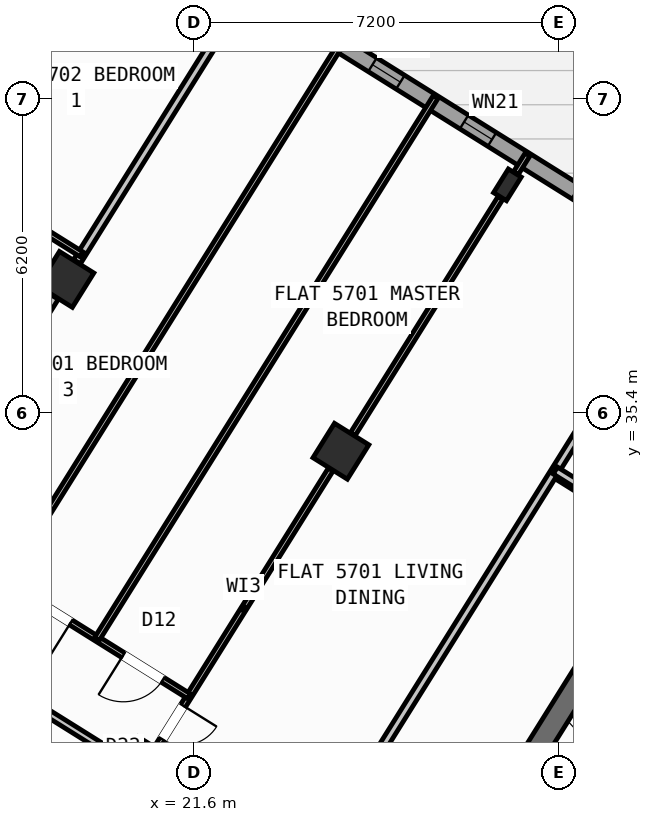
"""IFC4 building model, lengths in metres.
Left out: names, types, materials, properties, quantities, classifications, styles, units other than length and angle.
Written with IfcOpenShell. Run it as: python <this file> out.ifc"""

import sys

from ifc_helpers import new_model, si_unit, direction, frame, frame_2d, origin, origin_2d, place, context, subcontext, project, spatial, rectangle, hollow_rectangle, i_section, extrude, source, transform, mapped, element, fill, save


model = new_model("IFC4")
c1 = context("Model", 3, precision=1e-05, world=origin(), true_north=direction((0.0, 1.0)))
c2 = subcontext(c1, "Body", "Model", "MODEL_VIEW")
j1 = project(units=[si_unit("LENGTHUNIT", "METRE"), si_unit("PLANEANGLEUNIT", "RADIAN")], contexts=[c1])
p1 = place(None, origin())
s1 = spatial("IfcSite", under=j1, at=p1, CompositionType="ELEMENT")
p2 = place(p1, origin())
s2 = spatial("IfcBuilding", under=s1, at=p2, CompositionType="ELEMENT")
p3 = place(p2, frame((0.0, 0.0, 225.6)))
s3 = spatial("IfcBuildingStorey", under=s2, at=p3, CompositionType="ELEMENT", Elevation=225.6)
p4 = place(p3, frame((29.544, 30.636, 0.0), z_axis=(0.0, 0.0, 1.0), x_axis=(-0.529902075036, -0.848058836916, 0.0)))
e1 = element("IfcWall", 1, at=p4, inside=s3, PredefinedType="SHEAR", context=c2, shape_type="SweptSolid", body=[
    extrude(rectangle(XDim=3.625, YDim=0.45, at=frame_2d((1.812, 0.0))), origin(), (0.0, 0.0, 1.0), 3.35),
])
m1 = source(origin(), c2, "Body", "SweptSolid", [
    extrude(i_section(OverallWidth=0.3, OverallDepth=0.55, WebThickness=0.015, FlangeThickness=0.029, at=origin_2d()), origin(), (0.0, 0.0, 1.0), 3.6),
])
p5 = place(p3, frame((27.786, 39.901, 0.0), z_axis=(0.0, 0.0, 1.0), x_axis=(-0.848048096156, 0.529919264233, 0.0)))
e2 = element("IfcColumn", 2, at=p5, inside=s3, PredefinedType="COLUMN", context=c2, shape_type="MappedRepresentation", body=[
    mapped(m1, transform((0.0, 0.0, 0.0), scale=1.0)),
])
m2 = source(origin(), c2, "Body", "SweptSolid", [
    extrude(hollow_rectangle(XDim=0.8, YDim=0.8, WallThickness=0.032, at=origin_2d()), origin(), (0.0, 0.0, 1.0), 3.6),
])
for number, where, z_axis, x_axis in (
    (3, (24.5, 34.643, 0.0), (0.0, 0.0, 1.0), (-0.848, 0.53, 0.0)),
    (4, (20.632, 28.452, 0.0), (0.0, 0.0, 1.0), (-0.848, 0.53, 0.0)),
    (5, (19.073, 38.034, 0.0), (0.0, 0.0, 1.0), (-0.848, 0.53, 0.0)),
):
    element("IfcColumn", number, at=place(p3, frame(where, z_axis=z_axis, x_axis=x_axis)), inside=s3, PredefinedType="COLUMN", context=c2, shape_type="MappedRepresentation", body=[
        mapped(m2, transform((0.0, 0.0, 0.0), scale=1.0)),
    ])
p6 = place(p3, frame((17.424, 47.083, 0.0), z_axis=(0.0, 0.0, 1.0), x_axis=(0.848049927979, -0.529916332693, 0.0)))
e6 = element("IfcWall", 6, at=p6, inside=s3, PredefinedType="STANDARD", context=c2, shape_type="SweptSolid", body=[
    extrude(rectangle(XDim=29.223, YDim=0.32, at=frame_2d((14.612, 0.0))), origin(), (0.0, 0.0, 1.0), 3.35),
])
p7 = place(p6, frame((3.709, 0.0, 0.0)))
e7 = element("IfcOpeningElement", 7, at=p7, cuts=e6, PredefinedType="OPENING", context=c2, shape_type="SweptSolid", body=[
    extrude(rectangle(XDim=1.05, YDim=2.15, at=frame_2d((0.525, 1.075))), frame((0.0, 0.17, 0.0), z_axis=(0.0, -1.0, 0.0), x_axis=(1.0, 0.0, 0.0)), (0.0, 0.0, 1.0), 0.34),
])
p8 = place(p6, frame((0.809, 0.0, 1.0)))
e8 = element("IfcOpeningElement", 8, at=p8, cuts=e6, PredefinedType="OPENING", context=c2, shape_type="SweptSolid", body=[
    extrude(rectangle(XDim=0.9, YDim=1.25, at=frame_2d((0.45, 0.625))), frame((0.0, 0.17, 0.0), z_axis=(0.0, -1.0, 0.0), x_axis=(1.0, 0.0, 0.0)), (0.0, 0.0, 1.0), 0.34),
])
p9 = place(p6, frame((13.811, 0.0, 0.9)))
e9 = element("IfcOpeningElement", 9, at=p9, cuts=e6, PredefinedType="OPENING", context=c2, shape_type="SweptSolid", body=[
    extrude(rectangle(XDim=1.35, YDim=1.45, at=frame_2d((0.675, 0.725))), frame((0.0, 0.17, 0.0), z_axis=(0.0, -1.0, 0.0), x_axis=(1.0, 0.0, 0.0)), (0.0, 0.0, 1.0), 0.34),
])
p10 = place(p6, frame((17.254, 0.0, 1.0)))
e10 = element("IfcOpeningElement", 10, at=p10, cuts=e6, PredefinedType="OPENING", context=c2, shape_type="SweptSolid", body=[
    extrude(rectangle(XDim=0.9, YDim=1.25, at=frame_2d((0.45, 0.625))), frame((0.0, 0.17, 0.0), z_axis=(0.0, -1.0, 0.0), x_axis=(1.0, 0.0, 0.0)), (0.0, 0.0, 1.0), 0.34),
])
p11 = place(p6, frame((21.364, 0.0, 1.0)))
e11 = element("IfcOpeningElement", 11, at=p11, cuts=e6, PredefinedType="OPENING", context=c2, shape_type="SweptSolid", body=[
    extrude(rectangle(XDim=0.9, YDim=1.25, at=frame_2d((0.45, 0.625))), frame((0.0, 0.17, 0.0), z_axis=(0.0, -1.0, 0.0), x_axis=(1.0, 0.0, 0.0)), (0.0, 0.0, 1.0), 0.34),
])
p12 = place(p6, frame((26.003, 0.0, 1.0)))
e12 = element("IfcOpeningElement", 12, at=p12, cuts=e6, PredefinedType="OPENING", context=c2, shape_type="SweptSolid", body=[
    extrude(rectangle(XDim=0.9, YDim=1.25, at=frame_2d((0.45, 0.625))), frame((0.0, 0.17, 0.0), z_axis=(0.0, -1.0, 0.0), x_axis=(1.0, 0.0, 0.0)), (0.0, 0.0, 1.0), 0.34),
])
p13 = place(p6, frame((11.211, 0.0, 1.0)))
e13 = element("IfcOpeningElement", 13, at=p13, cuts=e6, PredefinedType="OPENING", context=c2, shape_type="SweptSolid", body=[
    extrude(rectangle(XDim=0.65, YDim=1.15, at=frame_2d((0.325, 0.575))), frame((0.0, 0.17, 0.0), z_axis=(0.0, -1.0, 0.0), x_axis=(1.0, 0.0, 0.0)), (0.0, 0.0, 1.0), 0.34),
])
p14 = place(p6, frame((9.079, 0.0, 1.0)))
e14 = element("IfcOpeningElement", 14, at=p14, cuts=e6, PredefinedType="OPENING", context=c2, shape_type="SweptSolid", body=[
    extrude(rectangle(XDim=0.65, YDim=1.15, at=frame_2d((0.325, 0.575))), frame((0.0, 0.17, 0.0), z_axis=(0.0, -1.0, 0.0), x_axis=(1.0, 0.0, 0.0)), (0.0, 0.0, 1.0), 0.34),
])
p15 = place(p6, frame((6.951, 0.0, 1.0)))
e15 = element("IfcOpeningElement", 15, at=p15, cuts=e6, PredefinedType="OPENING", context=c2, shape_type="SweptSolid", body=[
    extrude(rectangle(XDim=0.65, YDim=1.15, at=frame_2d((0.325, 0.575))), frame((0.0, 0.17, 0.0), z_axis=(0.0, -1.0, 0.0), x_axis=(1.0, 0.0, 0.0)), (0.0, 0.0, 1.0), 0.34),
])
p16 = place(p3, frame((30.914, 32.829, 0.0), z_axis=(0.0, 0.0, 1.0), x_axis=(-0.848008813643, 0.529982124211, 0.0)))
e16 = element("IfcWall", 16, at=p16, inside=s3, PredefinedType="PARTITIONING", context=c2, shape_type="SweptSolid", body=[
    extrude(rectangle(XDim=2.61, YDim=0.16, at=frame_2d((1.305, 0.0))), origin(), (0.0, 0.0, 1.0), 3.34),
])
p17 = place(p3, frame((31.239, 38.274, 0.0), z_axis=(0.0, 0.0, 1.0), x_axis=(-0.529921796515, -0.848046513806, 0.0)))
e17 = element("IfcWall", 17, at=p17, inside=s3, PredefinedType="PARTITIONING", context=c2, shape_type="SweptSolid", body=[
    extrude(rectangle(XDim=16.5, YDim=0.16, at=frame_2d((8.25, 0.0))), origin(), (0.0, 0.0, 1.0), 3.34),
])
p18 = place(p3, frame((22.495, 24.281, 0.0), z_axis=(0.0, 0.0, 1.0), x_axis=(-0.848052408131, 0.529912363569, 0.0)))
e18 = element("IfcWall", 18, at=p18, inside=s3, PredefinedType="PARTITIONING", context=c2, shape_type="SweptSolid", body=[
    extrude(rectangle(XDim=16.73, YDim=0.16, at=frame_2d((8.365, 0.0))), origin(), (0.0, 0.0, 1.0), 3.34),
])
p19 = place(p18, frame((1.385, 0.0, 0.0)))
e19 = element("IfcOpeningElement", 19, at=p19, cuts=e18, PredefinedType="OPENING", context=c2, shape_type="SweptSolid", body=[
    extrude(rectangle(XDim=1.0, YDim=2.1, at=frame_2d((0.5, 1.05))), frame((0.0, 0.09, 0.0), z_axis=(0.0, -1.0, 0.0), x_axis=(1.0, 0.0, 0.0)), (0.0, 0.0, 1.0), 0.18),
])
p20 = place(p18, frame((14.76, 0.0, 0.0)))
e20 = element("IfcOpeningElement", 20, at=p20, cuts=e18, PredefinedType="OPENING", context=c2, shape_type="SweptSolid", body=[
    extrude(rectangle(XDim=1.0, YDim=2.1, at=frame_2d((0.5, 1.05))), frame((0.0, 0.09, 0.0), z_axis=(0.0, -1.0, 0.0), x_axis=(1.0, 0.0, 0.0)), (0.0, 0.0, 1.0), 0.18),
])
p21 = place(p3, frame((21.329, 22.416, 0.0), z_axis=(0.0, 0.0, 1.0), x_axis=(-0.848052408131, 0.529912363569, 0.0)))
e21 = element("IfcWall", 21, at=p21, inside=s3, PredefinedType="PARTITIONING", context=c2, shape_type="SweptSolid", body=[
    extrude(rectangle(XDim=16.73, YDim=0.16, at=frame_2d((8.365, 0.0))), origin(), (0.0, 0.0, 1.0), 3.34),
])
p22 = place(p21, frame((1.505, 0.0, 0.0)))
e22 = element("IfcOpeningElement", 22, at=p22, cuts=e21, PredefinedType="OPENING", context=c2, shape_type="SweptSolid", body=[
    extrude(rectangle(XDim=1.0, YDim=2.1, at=frame_2d((0.5, 1.05))), frame((0.0, 0.09, 0.0), z_axis=(0.0, -1.0, 0.0), x_axis=(1.0, 0.0, 0.0)), (0.0, 0.0, 1.0), 0.18),
])
p23 = place(p21, frame((6.435, 0.0, 0.0)))
e23 = element("IfcOpeningElement", 23, at=p23, cuts=e21, PredefinedType="OPENING", context=c2, shape_type="SweptSolid", body=[
    extrude(rectangle(XDim=1.0, YDim=2.1, at=frame_2d((0.5, 1.05))), frame((0.0, 0.09, 0.0), z_axis=(0.0, -1.0, 0.0), x_axis=(1.0, 0.0, 0.0)), (0.0, 0.0, 1.0), 0.18),
])
p24 = place(p21, frame((12.784, 0.0, 0.0)))
e24 = element("IfcOpeningElement", 24, at=p24, cuts=e21, PredefinedType="OPENING", context=c2, shape_type="SweptSolid", body=[
    extrude(rectangle(XDim=1.0, YDim=2.1, at=frame_2d((0.5, 1.05))), frame((0.0, 0.09, 0.0), z_axis=(0.0, -1.0, 0.0), x_axis=(1.0, 0.0, 0.0)), (0.0, 0.0, 1.0), 0.18),
])
p25 = place(p3, frame((22.206, 43.049, 0.0), z_axis=(0.0, 0.0, 1.0), x_axis=(-0.529919150083, -0.848048167486, 0.0)))
e25 = element("IfcWall", 25, at=p25, inside=s3, PredefinedType="PARTITIONING", context=c2, shape_type="SweptSolid", body=[
    extrude(rectangle(XDim=5.501, YDim=0.16, at=frame_2d((2.75, 0.0))), origin(), (0.0, 0.0, 1.0), 2.825),
])
p26 = place(p3, frame((18.854, 37.685, 0.0), z_axis=(0.0, 0.0, 1.0), x_axis=(-0.529907440938, -0.848055484057, 0.0)))
e26 = element("IfcWall", 26, at=p26, inside=s3, PredefinedType="PARTITIONING", context=c2, shape_type="SweptSolid", body=[
    extrude(rectangle(XDim=6.476, YDim=0.16, at=frame_2d((3.238, 0.0))), origin(), (0.0, 0.0, 1.0), 2.825),
])
p27 = place(p3, frame((28.184, 40.501, 0.0), z_axis=(0.0, 0.0, 1.0), x_axis=(-0.529593308415, -0.848251688877, 0.0)))
e27 = element("IfcWall", 27, at=p27, inside=s3, PredefinedType="PARTITIONING", context=c2, shape_type="SweptSolid", body=[
    extrude(rectangle(XDim=0.433, YDim=0.11, at=frame_2d((0.216, 0.0))), origin(), (0.0, 0.0, 1.0), 3.34),
])
p28 = place(p3, frame((27.651, 39.647, 0.0), z_axis=(0.0, 0.0, 1.0), x_axis=(-0.529919150083, -0.848048167486, 0.0)))
e28 = element("IfcWall", 28, at=p28, inside=s3, PredefinedType="PARTITIONING", context=c2, shape_type="SweptSolid", body=[
    extrude(rectangle(XDim=5.501, YDim=0.11, at=frame_2d((2.75, 0.0))), origin(), (0.0, 0.0, 1.0), 2.825),
])
p29 = place(p3, frame((24.299, 34.283, 0.0), z_axis=(0.0, 0.0, 1.0), x_axis=(-0.529890499457, -0.848066069705, 0.0)))
e29 = element("IfcWall", 29, at=p29, inside=s3, PredefinedType="PARTITIONING", context=c2, shape_type="SweptSolid", body=[
    extrude(rectangle(XDim=6.476, YDim=0.11, at=frame_2d((3.238, 0.0))), origin(), (0.0, 0.0, 1.0), 2.825),
])
p30 = place(p29, frame((5.496, 0.0, 0.0)))
e30 = element("IfcOpeningElement", 30, at=p30, cuts=e29, PredefinedType="OPENING", context=c2, shape_type="SweptSolid", body=[
    extrude(rectangle(XDim=0.78, YDim=2.05, at=frame_2d((0.39, 1.025))), frame((0.0, 0.065, 0.0), z_axis=(0.0, -1.0, 0.0), x_axis=(1.0, 0.0, 0.0)), (0.0, 0.0, 1.0), 0.13),
])
p31 = place(p3, frame((20.203, 28.543, 0.0), z_axis=(0.0, 0.0, 1.0), x_axis=(-0.848049955116, 0.529916289265, 0.0)))
e31 = element("IfcWall", 31, at=p31, inside=s3, PredefinedType="PLUMBINGWALL", context=c2, shape_type="SweptSolid", body=[
    extrude(rectangle(XDim=5.576, YDim=0.14, at=frame_2d((2.788, 0.0))), origin(), (0.0, 0.0, 1.0), 2.825),
])
p32 = place(p31, frame((2.338, 0.0, 0.0)))
e32 = element("IfcOpeningElement", 32, at=p32, cuts=e31, PredefinedType="OPENING", context=c2, shape_type="SweptSolid", body=[
    extrude(rectangle(XDim=0.78, YDim=2.05, at=frame_2d((0.39, 1.025))), frame((0.0, 0.08, 0.0), z_axis=(0.0, -1.0, 0.0), x_axis=(1.0, 0.0, 0.0)), (0.0, 0.0, 1.0), 0.16),
])
p33 = place(p3, frame((21.502, 29.807, 0.0), z_axis=(0.0, 0.0, 1.0), x_axis=(-0.848051709137, 0.529913482212, 0.0)))
e33 = element("IfcWall", 33, at=p33, inside=s3, PredefinedType="PARTITIONING", context=c2, shape_type="SweptSolid", body=[
    extrude(rectangle(XDim=6.42, YDim=0.11, at=frame_2d((3.21, 0.0))), origin(), (0.0, 0.0, 1.0), 3.34),
])
p34 = place(p33, frame((0.61, 0.0, 0.0)))
e34 = element("IfcOpeningElement", 34, at=p34, cuts=e33, PredefinedType="OPENING", context=c2, shape_type="SweptSolid", body=[
    extrude(rectangle(XDim=0.92, YDim=2.08, at=frame_2d((0.46, 1.04))), frame((0.0, 0.065, 0.0), z_axis=(0.0, -1.0, 0.0), x_axis=(1.0, 0.0, 0.0)), (0.0, 0.0, 1.0), 0.13),
])
p35 = place(p33, frame((2.75, 0.0, 0.0)))
e35 = element("IfcOpeningElement", 35, at=p35, cuts=e33, PredefinedType="OPENING", context=c2, shape_type="SweptSolid", body=[
    extrude(rectangle(XDim=0.92, YDim=2.08, at=frame_2d((0.46, 1.04))), frame((0.0, 0.065, 0.0), z_axis=(0.0, -1.0, 0.0), x_axis=(1.0, 0.0, 0.0)), (0.0, 0.0, 1.0), 0.13),
])
p36 = place(p33, frame((4.89, 0.0, 0.0)))
e36 = element("IfcOpeningElement", 36, at=p36, cuts=e33, PredefinedType="OPENING", context=c2, shape_type="SweptSolid", body=[
    extrude(rectangle(XDim=0.92, YDim=2.08, at=frame_2d((0.46, 1.04))), frame((0.0, 0.065, 0.0), z_axis=(0.0, -1.0, 0.0), x_axis=(1.0, 0.0, 0.0)), (0.0, 0.0, 1.0), 0.13),
])
p37 = place(p3, frame((26.37, 41.635, 0.0), z_axis=(0.0, 0.0, 1.0), x_axis=(-0.529925845384, -0.848043983761, 0.0)))
e37 = element("IfcWall", 37, at=p37, inside=s3, PredefinedType="PARTITIONING", context=c2, shape_type="SweptSolid", body=[
    extrude(rectangle(XDim=12.61, YDim=0.11, at=frame_2d((6.305, 0.0))), origin(), (0.0, 0.0, 1.0), 2.995),
])
p38 = place(p3, frame((24.555, 42.769, 0.0), z_axis=(0.0, 0.0, 1.0), x_axis=(-0.529911921261, -0.848052684511, 0.0)))
e38 = element("IfcWall", 38, at=p38, inside=s3, PredefinedType="PARTITIONING", context=c2, shape_type="SweptSolid", body=[
    extrude(rectangle(XDim=12.61, YDim=0.11, at=frame_2d((6.305, 0.0))), origin(), (0.0, 0.0, 1.0), 2.995),
])
p39 = place(p3, frame((19.67, 45.821, 0.0), z_axis=(0.0, 0.0, 1.0), x_axis=(-0.529920421309, -0.848047373134, 0.0)))
e39 = element("IfcWall", 39, at=p39, inside=s3, PredefinedType="PARTITIONING", context=c2, shape_type="SweptSolid", body=[
    extrude(rectangle(XDim=16.77, YDim=0.11, at=frame_2d((8.385, 0.0))), origin(), (0.0, 0.0, 1.0), 3.34),
])
p40 = place(p39, frame((15.13, 0.0, 0.0)))
e40 = element("IfcOpeningElement", 40, at=p40, cuts=e39, PredefinedType="OPENING", context=c2, shape_type="SweptSolid", body=[
    extrude(rectangle(XDim=0.78, YDim=2.05, at=frame_2d((0.39, 1.025))), frame((0.0, 0.065, 0.0), z_axis=(0.0, -1.0, 0.0), x_axis=(1.0, 0.0, 0.0)), (0.0, 0.0, 1.0), 0.13),
])
p41 = place(p39, frame((9.884, 0.0, 0.0)))
e41 = element("IfcOpeningElement", 41, at=p41, cuts=e39, PredefinedType="OPENING", context=c2, shape_type="SweptSolid", body=[
    extrude(rectangle(XDim=0.92, YDim=2.08, at=frame_2d((0.46, 1.04))), frame((0.0, 0.065, 0.0), z_axis=(0.0, -1.0, 0.0), x_axis=(1.0, 0.0, 0.0)), (0.0, 0.0, 1.0), 0.13),
])
p42 = place(p3, frame((19.382, 38.529, 0.0), z_axis=(0.0, 0.0, 1.0), x_axis=(-0.848051346257, 0.52991406295, 0.0)))
e42 = element("IfcWall", 42, at=p42, inside=s3, PredefinedType="PARTITIONING", context=c2, shape_type="SweptSolid", body=[
    extrude(rectangle(XDim=3.62, YDim=0.11, at=frame_2d((1.81, 0.0))), origin(), (0.0, 0.0, 1.0), 3.34),
])
p43 = place(p42, frame((1.35, 0.0, 0.0)))
e43 = element("IfcOpeningElement", 43, at=p43, cuts=e42, PredefinedType="OPENING", context=c2, shape_type="SweptSolid", body=[
    extrude(rectangle(XDim=0.92, YDim=2.08, at=frame_2d((0.46, 1.04))), frame((0.0, 0.065, 0.0), z_axis=(0.0, -1.0, 0.0), x_axis=(1.0, 0.0, 0.0)), (0.0, 0.0, 1.0), 0.13),
])
p44 = place(p3, frame((41.936, 26.012, 0.0), z_axis=(0.0, 0.0, 1.0), x_axis=(-0.848051154596, 0.529914369676, 0.0)))
e44 = element("IfcWall", 44, at=p44, inside=s3, PredefinedType="PARTITIONING", context=c2, shape_type="SweptSolid", body=[
    extrude(rectangle(XDim=15.57, YDim=0.16, at=frame_2d((7.785, 0.0))), origin(), (0.0, 0.0, 1.0), 3.34),
])
p45 = place(p44, frame((10.83, 0.0, 0.0)))
e45 = element("IfcOpeningElement", 45, at=p45, cuts=e44, PredefinedType="OPENING", context=c2, shape_type="SweptSolid", body=[
    extrude(rectangle(XDim=1.0, YDim=2.1, at=frame_2d((0.5, 1.05))), frame((0.0, 0.09, 0.0), z_axis=(0.0, -1.0, 0.0), x_axis=(1.0, 0.0, 0.0)), (0.0, 0.0, 1.0), 0.18),
])
m3 = source(origin(), c2, "Body", "SweptSolid", [
    extrude(rectangle(XDim=0.65, YDim=1.15, at=frame_2d((0.325, 0.575))), frame((0.0, 0.03, 0.0), z_axis=(0.0, -1.0, 0.0), x_axis=(1.0, 0.0, 0.0)), (0.0, 0.0, 1.0), 0.06),
])
p46 = place(p13, origin())
e46 = element("IfcWindow", 46, at=p46, inside=s3, PartitioningType="SINGLE_PANEL", PredefinedType="WINDOW", context=c2, shape_type="MappedRepresentation", body=[
    mapped(m3, transform((0.0, 0.0, 0.0), scale=1.0)),
])
fill(e13, e46)
p47 = place(p14, origin())
e47 = element("IfcWindow", 47, at=p47, inside=s3, PartitioningType="SINGLE_PANEL", PredefinedType="WINDOW", context=c2, shape_type="MappedRepresentation", body=[
    mapped(m3, transform((0.0, 0.0, 0.0), scale=1.0)),
])
fill(e14, e47)
m4 = source(origin(), c2, "Body", "SweptSolid", [
    extrude(rectangle(XDim=0.78, YDim=2.05, at=frame_2d((0.39, 1.025))), frame((0.0, 0.025, 0.0), z_axis=(0.0, -1.0, 0.0), x_axis=(1.0, 0.0, 0.0)), (0.0, 0.0, 1.0), 0.05),
])
p48 = place(p30, origin())
e48 = element("IfcDoor", 48, at=p48, inside=s3, OperationType="SINGLE_SWING_LEFT", PredefinedType="DOOR", context=c2, shape_type="MappedRepresentation", body=[
    mapped(m4, transform((0.0, 0.0, 0.0), scale=1.0)),
])
fill(e30, e48)
m5 = source(origin(), c2, "Body", "SweptSolid", [
    extrude(rectangle(XDim=0.92, YDim=2.08, at=frame_2d((0.46, 1.04))), frame((0.0, 0.025, 0.0), z_axis=(0.0, -1.0, 0.0), x_axis=(1.0, 0.0, 0.0)), (0.0, 0.0, 1.0), 0.05),
])
p49 = place(p34, origin())
e49 = element("IfcDoor", 49, at=p49, inside=s3, OperationType="SINGLE_SWING_RIGHT", PredefinedType="DOOR", context=c2, shape_type="MappedRepresentation", body=[
    mapped(m5, transform((0.0, 0.0, 0.0), scale=1.0)),
])
fill(e34, e49)
p50 = place(p35, origin())
e50 = element("IfcDoor", 50, at=p50, inside=s3, OperationType="SINGLE_SWING_LEFT", PredefinedType="DOOR", context=c2, shape_type="MappedRepresentation", body=[
    mapped(m5, transform((0.0, 0.0, 0.0), scale=1.0)),
])
fill(e35, e50)
save(model, sys.argv[1])
